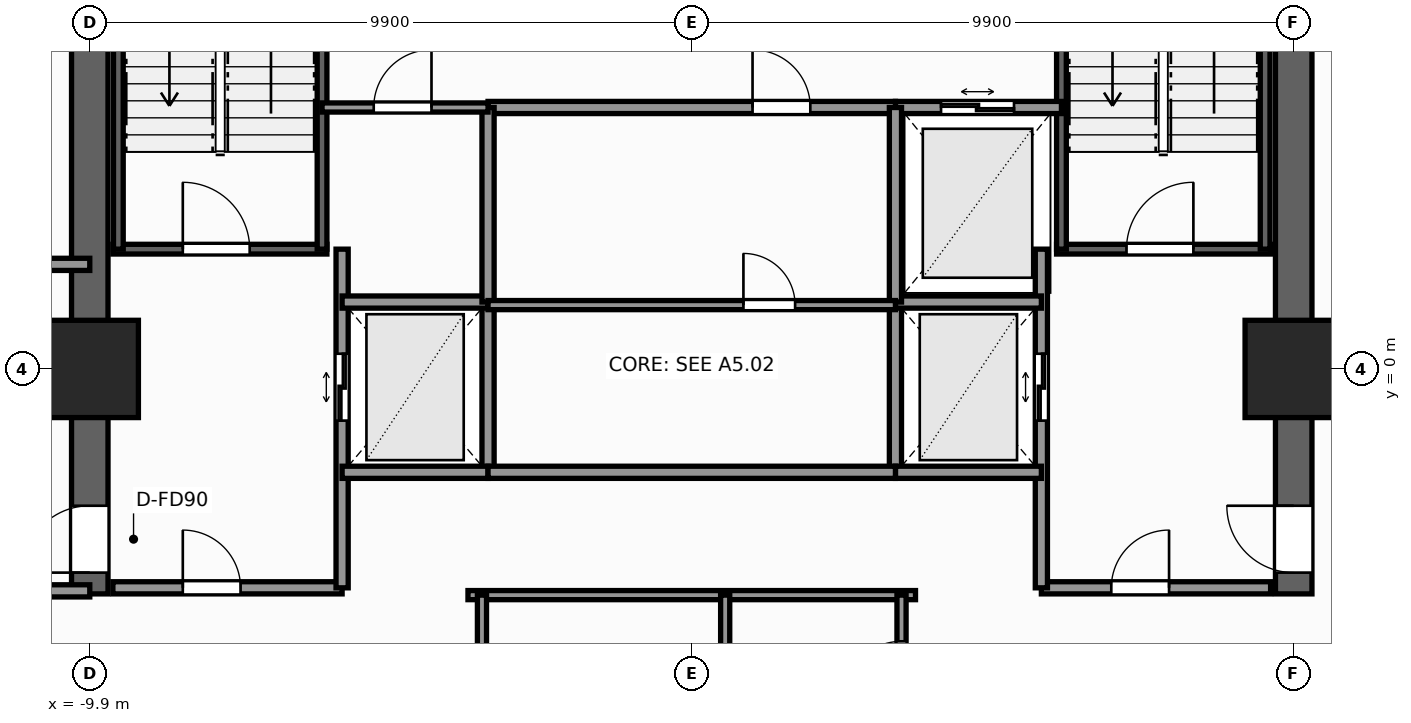
"""IFC4 building model, lengths in metres.
Left out: names, types, materials, properties, quantities, classifications, styles, units other than length and angle.
Written with IfcOpenShell. Run it as: python <this file> out.ifc"""

import sys

from ifc_helpers import new_model, si_unit, direction, frame, frame_2d, origin, origin_2d, place, context, subcontext, project, spatial, rectangle, extrude, element, fill, save


model = new_model("IFC4")
c1 = context("Model", 3, precision=1e-05, world=origin(), true_north=direction((0.0, 1.0)))
c2 = subcontext(c1, "Body", "Model", "MODEL_VIEW")
j1 = project(units=[si_unit("LENGTHUNIT", "METRE"), si_unit("PLANEANGLEUNIT", "RADIAN")], contexts=[c1])
p1 = place(None, origin())
s1 = spatial("IfcSite", under=j1, at=p1, CompositionType="ELEMENT")
p2 = place(p1, origin())
s2 = spatial("IfcBuilding", under=s1, at=p2, CompositionType="ELEMENT")
p3 = place(p2, origin())
s3 = spatial("IfcBuildingStorey", under=s2, at=p3, CompositionType="ELEMENT", Elevation=0.0)
p4 = place(p3, frame((-9.9, -3.7, 0.0), z_axis=(0.0, 0.0, 1.0), x_axis=(0.0, 1.0, 0.0)))
e1 = element("IfcWall", 1, at=p4, inside=s3, PredefinedType="SHEAR", context=c2, shape_type="SweptSolid", body=[
    extrude(rectangle(XDim=13.3, YDim=0.6, at=frame_2d((6.65, 0.0))), origin(), (0.0, 0.0, 1.0), 5.5),
])
p5 = place(p4, frame((0.35, 0.0, 0.0)))
e2 = element("IfcOpeningElement", 2, at=p5, cuts=e1, PredefinedType="OPENING", context=c2, shape_type="SweptSolid", body=[
    extrude(rectangle(XDim=1.1, YDim=2.2, at=frame_2d((0.55, 1.1))), frame((0.0, 0.31, 0.0), z_axis=(0.0, -1.0, 0.0), x_axis=(1.0, 0.0, 0.0)), (0.0, 0.0, 1.0), 0.62),
])
p6 = place(p3, frame((9.9, -3.7, 0.0), z_axis=(0.0, 0.0, 1.0), x_axis=(0.0, 1.0, 0.0)))
e3 = element("IfcWall", 3, at=p6, inside=s3, PredefinedType="SHEAR", context=c2, shape_type="SweptSolid", body=[
    extrude(rectangle(XDim=13.3, YDim=0.6, at=frame_2d((6.65, 0.0))), origin(), (0.0, 0.0, 1.0), 5.5),
])
p7 = place(p6, frame((0.35, 0.0, 0.0)))
e4 = element("IfcOpeningElement", 4, at=p7, cuts=e3, PredefinedType="OPENING", context=c2, shape_type="SweptSolid", body=[
    extrude(rectangle(XDim=1.1, YDim=2.2, at=frame_2d((0.55, 1.1))), frame((0.0, 0.31, 0.0), z_axis=(0.0, -1.0, 0.0), x_axis=(1.0, 0.0, 0.0)), (0.0, 0.0, 1.0), 0.62),
])
for number, where, z_axis, x_axis in (
    (5, (9.9, 0.0, 0.0), (0.0, 0.0, 1.0), (1.0, 0.0, 0.0)),
    (6, (-9.9, 0.0, 0.0), (0.0, 0.0, 1.0), (1.0, 0.0, 0.0)),
):
    element("IfcColumn", number, at=place(p3, frame(where, z_axis=z_axis, x_axis=x_axis)), inside=s3, PredefinedType="COLUMN", context=c2, shape_type="SweptSolid", body=[
        extrude(rectangle(XDim=1.6, YDim=1.6, at=origin_2d()), origin(), (0.0, 0.0, 1.0), 5.5),
    ])
p8 = place(p3, frame((-9.52, 1.97, 0.0), z_axis=(0.0, 0.0, 1.0), x_axis=(1.0, 0.0, 0.0)))
e7 = element("IfcWall", 7, at=p8, inside=s3, PredefinedType="SHEAR", context=c2, shape_type="SweptSolid", body=[
    extrude(rectangle(XDim=3.52, YDim=0.16, at=frame_2d((1.76, 0.0))), origin(), (0.0, 0.0, 1.0), 5.5),
])
p9 = place(p8, frame((1.15, 0.0, 0.0)))
e8 = element("IfcOpeningElement", 8, at=p9, cuts=e7, PredefinedType="OPENING", context=c2, shape_type="SweptSolid", body=[
    extrude(rectangle(XDim=1.1, YDim=2.2, at=frame_2d((0.55, 1.1))), frame((0.0, 0.09, 0.0), z_axis=(0.0, -1.0, 0.0), x_axis=(1.0, 0.0, 0.0)), (0.0, 0.0, 1.0), 0.18),
])
for number, where, z_axis, x_axis in (
    (9, (-9.43, 1.97, 0.0), (0.0, 0.0, 1.0), (0.0, 1.0, 0.0)),
    (10, (-6.08, 1.97, 0.0), (0.0, 0.0, 1.0), (0.0, 1.0, 0.0)),
):
    element("IfcWall", number, at=place(p3, frame(where, z_axis=z_axis, x_axis=x_axis)), inside=s3, PredefinedType="SHEAR", context=c2, shape_type="SweptSolid", body=[
        extrude(rectangle(XDim=7.56, YDim=0.16, at=frame_2d((3.78, 0.0))), origin(), (0.0, 0.0, 1.0), 5.5),
    ])
p10 = place(p3, frame((6.0, 1.97, 0.0), z_axis=(0.0, 0.0, 1.0), x_axis=(1.0, 0.0, 0.0)))
e11 = element("IfcWall", 11, at=p10, inside=s3, PredefinedType="SHEAR", context=c2, shape_type="SweptSolid", body=[
    extrude(rectangle(XDim=3.52, YDim=0.16, at=frame_2d((1.76, 0.0))), origin(), (0.0, 0.0, 1.0), 5.5),
])
p11 = place(p10, frame((1.15, 0.0, 0.0)))
e12 = element("IfcOpeningElement", 12, at=p11, cuts=e11, PredefinedType="OPENING", context=c2, shape_type="SweptSolid", body=[
    extrude(rectangle(XDim=1.1, YDim=2.2, at=frame_2d((0.55, 1.1))), frame((0.0, 0.09, 0.0), z_axis=(0.0, -1.0, 0.0), x_axis=(1.0, 0.0, 0.0)), (0.0, 0.0, 1.0), 0.18),
])
for number, where, z_axis, x_axis in (
    (13, (6.08, 1.97, 0.0), (0.0, 0.0, 1.0), (0.0, 1.0, 0.0)),
    (14, (9.43, 1.97, 0.0), (0.0, 0.0, 1.0), (0.0, 1.0, 0.0)),
):
    element("IfcWall", number, at=place(p3, frame(where, z_axis=z_axis, x_axis=x_axis)), inside=s3, PredefinedType="SHEAR", context=c2, shape_type="SweptSolid", body=[
        extrude(rectangle(XDim=7.56, YDim=0.16, at=frame_2d((3.78, 0.0))), origin(), (0.0, 0.0, 1.0), 5.5),
    ])
p12 = place(p3, frame((-9.52, -3.6, 0.0), z_axis=(0.0, 0.0, 1.0), x_axis=(1.0, 0.0, 0.0)))
e15 = element("IfcWall", 15, at=p12, inside=s3, PredefinedType="SOLIDWALL", context=c2, shape_type="SweptSolid", body=[
    extrude(rectangle(XDim=3.77, YDim=0.2, at=frame_2d((1.885, 0.0))), origin(), (0.0, 0.0, 1.0), 5.22),
])
p13 = place(p12, frame((1.15, 0.0, 0.0)))
e16 = element("IfcOpeningElement", 16, at=p13, cuts=e15, PredefinedType="OPENING", context=c2, shape_type="SweptSolid", body=[
    extrude(rectangle(XDim=0.95, YDim=2.06, at=frame_2d((0.475, 1.03))), frame((0.0, 0.11, 0.0), z_axis=(0.0, -1.0, 0.0), x_axis=(1.0, 0.0, 0.0)), (0.0, 0.0, 1.0), 0.22),
])
p14 = place(p3, frame((-5.75, -3.6, 0.0), z_axis=(0.0, 0.0, 1.0), x_axis=(0.0, 1.0, 0.0)))
e17 = element("IfcWall", 17, at=p14, inside=s3, PredefinedType="SOLIDWALL", context=c2, shape_type="SweptSolid", body=[
    extrude(rectangle(XDim=5.57, YDim=0.2, at=frame_2d((2.785, 0.0))), origin(), (0.0, 0.0, 1.0), 5.22),
])
p15 = place(p14, frame((2.75, 0.0, 0.0)))
e18 = element("IfcOpeningElement", 18, at=p15, cuts=e17, PredefinedType="OPENING", context=c2, shape_type="SweptSolid", body=[
    extrude(rectangle(XDim=1.1, YDim=2.2, at=frame_2d((0.55, 1.1))), frame((0.0, 0.11, 0.0), z_axis=(0.0, -1.0, 0.0), x_axis=(1.0, 0.0, 0.0)), (0.0, 0.0, 1.0), 0.22),
])
p16 = place(p3, frame((-3.35, -1.7, 0.0), z_axis=(0.0, 0.0, 1.0), x_axis=(0.0, 1.0, 0.0)))
e19 = element("IfcWall", 19, at=p16, inside=s3, PredefinedType="SOLIDWALL", context=c2, shape_type="SweptSolid", body=[
    extrude(rectangle(XDim=2.8, YDim=0.2, at=frame_2d((1.4, 0.0))), origin(), (0.0, 0.0, 1.0), 5.22),
])
for number, where, z_axis, x_axis in (
    (20, (-5.75, -1.7, 0.0), (0.0, 0.0, 1.0), (1.0, 0.0, 0.0)),
    (21, (-5.75, 1.1, 0.0), (0.0, 0.0, 1.0), (1.0, 0.0, 0.0)),
):
    element("IfcWall", number, at=place(p3, frame(where, z_axis=z_axis, x_axis=x_axis)), inside=s3, PredefinedType="SOLIDWALL", context=c2, shape_type="SweptSolid", body=[
        extrude(rectangle(XDim=2.4, YDim=0.2, at=frame_2d((1.2, 0.0))), origin(), (0.0, 0.0, 1.0), 5.22),
    ])
p17 = place(p3, frame((5.75, -3.6, 0.0), z_axis=(0.0, 0.0, 1.0), x_axis=(1.0, 0.0, 0.0)))
e22 = element("IfcWall", 22, at=p17, inside=s3, PredefinedType="SOLIDWALL", context=c2, shape_type="SweptSolid", body=[
    extrude(rectangle(XDim=3.77, YDim=0.2, at=frame_2d((1.885, 0.0))), origin(), (0.0, 0.0, 1.0), 5.22),
])
p18 = place(p17, frame((1.15, 0.0, 0.0)))
e23 = element("IfcOpeningElement", 23, at=p18, cuts=e22, PredefinedType="OPENING", context=c2, shape_type="SweptSolid", body=[
    extrude(rectangle(XDim=0.95, YDim=2.06, at=frame_2d((0.475, 1.03))), frame((0.0, 0.11, 0.0), z_axis=(0.0, -1.0, 0.0), x_axis=(1.0, 0.0, 0.0)), (0.0, 0.0, 1.0), 0.22),
])
p19 = place(p3, frame((5.75, -3.6, 0.0), z_axis=(0.0, 0.0, 1.0), x_axis=(0.0, 1.0, 0.0)))
e24 = element("IfcWall", 24, at=p19, inside=s3, PredefinedType="SOLIDWALL", context=c2, shape_type="SweptSolid", body=[
    extrude(rectangle(XDim=5.57, YDim=0.2, at=frame_2d((2.785, 0.0))), origin(), (0.0, 0.0, 1.0), 5.22),
])
p20 = place(p19, frame((2.75, 0.0, 0.0)))
e25 = element("IfcOpeningElement", 25, at=p20, cuts=e24, PredefinedType="OPENING", context=c2, shape_type="SweptSolid", body=[
    extrude(rectangle(XDim=1.1, YDim=2.2, at=frame_2d((0.55, 1.1))), frame((0.0, 0.11, 0.0), z_axis=(0.0, -1.0, 0.0), x_axis=(1.0, 0.0, 0.0)), (0.0, 0.0, 1.0), 0.22),
])
p21 = place(p3, frame((3.35, -1.7, 0.0), z_axis=(0.0, 0.0, 1.0), x_axis=(0.0, 1.0, 0.0)))
e26 = element("IfcWall", 26, at=p21, inside=s3, PredefinedType="SOLIDWALL", context=c2, shape_type="SweptSolid", body=[
    extrude(rectangle(XDim=2.8, YDim=0.2, at=frame_2d((1.4, 0.0))), origin(), (0.0, 0.0, 1.0), 5.22),
])
for number, where, z_axis, x_axis in (
    (27, (3.35, -1.7, 0.0), (0.0, 0.0, 1.0), (1.0, 0.0, 0.0)),
    (28, (3.35, 1.1, 0.0), (0.0, 0.0, 1.0), (1.0, 0.0, 0.0)),
):
    element("IfcWall", number, at=place(p3, frame(where, z_axis=z_axis, x_axis=x_axis)), inside=s3, PredefinedType="SOLIDWALL", context=c2, shape_type="SweptSolid", body=[
        extrude(rectangle(XDim=2.4, YDim=0.2, at=frame_2d((1.2, 0.0))), origin(), (0.0, 0.0, 1.0), 5.22),
    ])
p22 = place(p3, frame((3.35, 4.3, 0.0), z_axis=(0.0, 0.0, 1.0), x_axis=(1.0, 0.0, 0.0)))
e29 = element("IfcWall", 29, at=p22, inside=s3, PredefinedType="SOLIDWALL", context=c2, shape_type="SweptSolid", body=[
    extrude(rectangle(XDim=2.73, YDim=0.2, at=frame_2d((1.365, 0.0))), origin(), (0.0, 0.0, 1.0), 5.22),
])
p23 = place(p22, frame((0.75, 0.0, 0.0)))
e30 = element("IfcOpeningElement", 30, at=p23, cuts=e29, PredefinedType="OPENING", context=c2, shape_type="SweptSolid", body=[
    extrude(rectangle(XDim=1.2, YDim=2.25, at=frame_2d((0.6, 1.125))), frame((0.0, 0.11, 0.0), z_axis=(0.0, -1.0, 0.0), x_axis=(1.0, 0.0, 0.0)), (0.0, 0.0, 1.0), 0.22),
])
p24 = place(p3, frame((-3.35, 4.3, 0.0), z_axis=(0.0, 0.0, 1.0), x_axis=(1.0, 0.0, 0.0)))
e31 = element("IfcWall", 31, at=p24, inside=s3, PredefinedType="SOLIDWALL", context=c2, shape_type="SweptSolid", body=[
    extrude(rectangle(XDim=6.7, YDim=0.2, at=frame_2d((3.35, 0.0))), origin(), (0.0, 0.0, 1.0), 5.22),
])
p25 = place(p24, frame((4.35, 0.0, 0.0)))
e32 = element("IfcOpeningElement", 32, at=p25, cuts=e31, PredefinedType="OPENING", context=c2, shape_type="SweptSolid", body=[
    extrude(rectangle(XDim=0.95, YDim=2.06, at=frame_2d((0.475, 1.03))), frame((0.0, 0.11, 0.0), z_axis=(0.0, -1.0, 0.0), x_axis=(1.0, 0.0, 0.0)), (0.0, 0.0, 1.0), 0.22),
])
p26 = place(p3, frame((-3.35, -1.7, 0.0), z_axis=(0.0, 0.0, 1.0), x_axis=(1.0, 0.0, 0.0)))
e33 = element("IfcWall", 33, at=p26, inside=s3, PredefinedType="SOLIDWALL", context=c2, shape_type="SweptSolid", body=[
    extrude(rectangle(XDim=6.7, YDim=0.2, at=frame_2d((3.35, 0.0))), origin(), (0.0, 0.0, 1.0), 5.22),
])
for number, where, z_axis, x_axis in (
    (34, (-3.35, 1.1, 0.0), (0.0, 0.0, 1.0), (0.0, 1.0, 0.0)),
    (35, (3.35, 1.1, 0.0), (0.0, 0.0, 1.0), (0.0, 1.0, 0.0)),
):
    element("IfcWall", number, at=place(p3, frame(where, z_axis=z_axis, x_axis=x_axis)), inside=s3, PredefinedType="SOLIDWALL", context=c2, shape_type="SweptSolid", body=[
        extrude(rectangle(XDim=3.2, YDim=0.2, at=frame_2d((1.6, 0.0))), origin(), (0.0, 0.0, 1.0), 5.22),
    ])
p27 = place(p3, frame((-3.35, 1.05, 0.0), z_axis=(0.0, 0.0, 1.0), x_axis=(1.0, 0.0, 0.0)))
e36 = element("IfcWall", 36, at=p27, inside=s3, PredefinedType="PARTITIONING", context=c2, shape_type="SweptSolid", body=[
    extrude(rectangle(XDim=6.7, YDim=0.15, at=frame_2d((3.35, 0.0))), origin(), (0.0, 0.0, 1.0), 5.22),
])
p28 = place(p27, frame((4.2, 0.0, 0.0)))
e37 = element("IfcOpeningElement", 37, at=p28, cuts=e36, PredefinedType="OPENING", context=c2, shape_type="SweptSolid", body=[
    extrude(rectangle(XDim=0.85, YDim=2.03, at=frame_2d((0.425, 1.015))), frame((0.0, 0.085, 0.0), z_axis=(0.0, -1.0, 0.0), x_axis=(1.0, 0.0, 0.0)), (0.0, 0.0, 1.0), 0.17),
])
p29 = place(p3, frame((-3.68, -3.72, 0.0), z_axis=(0.0, 0.0, 1.0), x_axis=(1.0, 0.0, 0.0)))
e38 = element("IfcWall", 38, at=p29, inside=s3, PredefinedType="PARTITIONING", context=c2, shape_type="SweptSolid", body=[
    extrude(rectangle(XDim=7.36, YDim=0.15, at=frame_2d((3.68, 0.0))), origin(), (0.0, 0.0, 1.0), 5.22),
])
p30 = place(p3, frame((3.45, -6.08, 0.0), z_axis=(0.0, 0.0, 1.0), x_axis=(0.0, 1.0, 0.0)))
e39 = element("IfcWall", 39, at=p30, inside=s3, PredefinedType="PARTITIONING", context=c2, shape_type="SweptSolid", body=[
    extrude(rectangle(XDim=2.36, YDim=0.15, at=frame_2d((1.18, 0.0))), origin(), (0.0, 0.0, 1.0), 5.22),
])
p31 = place(p30, frame((0.65, 0.0, 0.0)))
e40 = element("IfcOpeningElement", 40, at=p31, cuts=e39, PredefinedType="OPENING", context=c2, shape_type="SweptSolid", body=[
    extrude(rectangle(XDim=0.95, YDim=2.06, at=frame_2d((0.475, 1.03))), frame((0.0, 0.085, 0.0), z_axis=(0.0, -1.0, 0.0), x_axis=(1.0, 0.0, 0.0)), (0.0, 0.0, 1.0), 0.17),
])
p32 = place(p3, frame((-3.45, -6.08, 0.0), z_axis=(0.0, 0.0, 1.0), x_axis=(0.0, 1.0, 0.0)))
e41 = element("IfcWall", 41, at=p32, inside=s3, PredefinedType="PARTITIONING", context=c2, shape_type="SweptSolid", body=[
    extrude(rectangle(XDim=2.36, YDim=0.15, at=frame_2d((1.18, 0.0))), origin(), (0.0, 0.0, 1.0), 5.22),
])
p33 = place(p3, frame((0.55, -6.08, 0.0), z_axis=(0.0, 0.0, 1.0), x_axis=(0.0, 1.0, 0.0)))
e42 = element("IfcWall", 42, at=p33, inside=s3, PredefinedType="PARTITIONING", context=c2, shape_type="SweptSolid", body=[
    extrude(rectangle(XDim=2.36, YDim=0.15, at=frame_2d((1.18, 0.0))), origin(), (0.0, 0.0, 1.0), 5.22),
])
p34 = place(p33, frame((0.65, 0.0, 0.0)))
e43 = element("IfcOpeningElement", 43, at=p34, cuts=e42, PredefinedType="OPENING", context=c2, shape_type="SweptSolid", body=[
    extrude(rectangle(XDim=0.9, YDim=2.06, at=frame_2d((0.45, 1.03))), frame((0.0, 0.085, 0.0), z_axis=(0.0, -1.0, 0.0), x_axis=(1.0, 0.0, 0.0)), (0.0, 0.0, 1.0), 0.17),
])
p35 = place(p3, frame((-6.08, 4.3, 0.0), z_axis=(0.0, 0.0, 1.0), x_axis=(1.0, 0.0, 0.0)))
e44 = element("IfcWall", 44, at=p35, inside=s3, PredefinedType="PARTITIONING", context=c2, shape_type="SweptSolid", body=[
    extrude(rectangle(XDim=2.73, YDim=0.15, at=frame_2d((1.365, 0.0))), origin(), (0.0, 0.0, 1.0), 5.22),
])
p36 = place(p35, frame((0.85, 0.0, 0.0)))
e45 = element("IfcOpeningElement", 45, at=p36, cuts=e44, PredefinedType="OPENING", context=c2, shape_type="SweptSolid", body=[
    extrude(rectangle(XDim=0.95, YDim=2.06, at=frame_2d((0.475, 1.03))), frame((0.0, 0.085, 0.0), z_axis=(0.0, -1.0, 0.0), x_axis=(1.0, 0.0, 0.0)), (0.0, 0.0, 1.0), 0.17),
])
p37 = place(p3, frame((-12.72, -3.65, 0.0), z_axis=(0.0, 0.0, 1.0), x_axis=(1.0, 0.0, 0.0)))
e46 = element("IfcWall", 46, at=p37, inside=s3, PredefinedType="SOLIDWALL", context=c2, shape_type="SweptSolid", body=[
    extrude(rectangle(XDim=2.82, YDim=0.2, at=frame_2d((1.41, 0.0))), origin(), (0.0, 0.0, 1.0), 4.255),
])
p38 = place(p3, frame((-21.85, 1.72, 0.0), z_axis=(0.0, 0.0, 1.0), x_axis=(1.0, 0.0, 0.0)))
e47 = element("IfcWall", 47, at=p38, inside=s3, PredefinedType="SOLIDWALL", context=c2, shape_type="SweptSolid", body=[
    extrude(rectangle(XDim=11.95, YDim=0.2, at=frame_2d((5.975, 0.0))), origin(), (0.0, 0.0, 1.0), 5.22),
])
p39 = place(p38, frame((9.8, 0.0, 0.0)))
e48 = element("IfcOpeningElement", 48, at=p39, cuts=e47, PredefinedType="OPENING", context=c2, shape_type="SweptSolid", body=[
    extrude(rectangle(XDim=1.1, YDim=2.2, at=frame_2d((0.55, 1.1))), frame((0.0, 0.11, 0.0), z_axis=(0.0, -1.0, 0.0), x_axis=(1.0, 0.0, 0.0)), (0.0, 0.0, 1.0), 0.22),
])
p40 = place(p9, origin())
e49 = element("IfcDoor", 49, at=p40, inside=s3, OperationType="SINGLE_SWING_LEFT", PredefinedType="DOOR", context=c2, shape_type="SweptSolid", body=[
    extrude(rectangle(XDim=1.1, YDim=2.2, at=frame_2d((0.55, 1.1))), frame((0.0, 0.025, 0.0), z_axis=(0.0, -1.0, 0.0), x_axis=(1.0, 0.0, 0.0)), (0.0, 0.0, 1.0), 0.05),
])
fill(e8, e49)
p41 = place(p11, origin())
e50 = element("IfcDoor", 50, at=p41, inside=s3, OperationType="SINGLE_SWING_RIGHT", PredefinedType="DOOR", context=c2, shape_type="SweptSolid", body=[
    extrude(rectangle(XDim=1.1, YDim=2.2, at=frame_2d((0.55, 1.1))), frame((0.0, 0.025, 0.0), z_axis=(0.0, -1.0, 0.0), x_axis=(1.0, 0.0, 0.0)), (0.0, 0.0, 1.0), 0.05),
])
fill(e12, e50)
p42 = place(p5, origin())
e51 = element("IfcDoor", 51, at=p42, inside=s3, OperationType="SINGLE_SWING_LEFT", PredefinedType="DOOR", context=c2, shape_type="SweptSolid", body=[
    extrude(rectangle(XDim=1.1, YDim=2.2, at=frame_2d((0.55, 1.1))), frame((0.0, 0.025, 0.0), z_axis=(0.0, -1.0, 0.0), x_axis=(1.0, 0.0, 0.0)), (0.0, 0.0, 1.0), 0.05),
])
fill(e2, e51)
p43 = place(p15, origin())
e52 = element("IfcDoor", 52, at=p43, inside=s3, OperationType="DOUBLE_DOOR_SLIDING", PredefinedType="DOOR", context=c2, shape_type="SweptSolid", body=[
    extrude(rectangle(XDim=1.1, YDim=2.2, at=frame_2d((0.55, 1.1))), frame((0.0, 0.025, 0.0), z_axis=(0.0, -1.0, 0.0), x_axis=(1.0, 0.0, 0.0)), (0.0, 0.0, 1.0), 0.05),
])
fill(e18, e52)
p44 = place(p7, origin())
e53 = element("IfcDoor", 53, at=p44, inside=s3, OperationType="SINGLE_SWING_RIGHT", PredefinedType="DOOR", context=c2, shape_type="SweptSolid", body=[
    extrude(rectangle(XDim=1.1, YDim=2.2, at=frame_2d((0.55, 1.1))), frame((0.0, 0.025, 0.0), z_axis=(0.0, -1.0, 0.0), x_axis=(1.0, 0.0, 0.0)), (0.0, 0.0, 1.0), 0.05),
])
fill(e4, e53)
p45 = place(p20, origin())
e54 = element("IfcDoor", 54, at=p45, inside=s3, OperationType="DOUBLE_DOOR_SLIDING", PredefinedType="DOOR", context=c2, shape_type="SweptSolid", body=[
    extrude(rectangle(XDim=1.1, YDim=2.2, at=frame_2d((0.55, 1.1))), frame((0.0, 0.025, 0.0), z_axis=(0.0, -1.0, 0.0), x_axis=(1.0, 0.0, 0.0)), (0.0, 0.0, 1.0), 0.05),
])
fill(e25, e54)
p46 = place(p23, origin())
e55 = element("IfcDoor", 55, at=p46, inside=s3, OperationType="DOUBLE_DOOR_SLIDING", PredefinedType="DOOR", context=c2, shape_type="SweptSolid", body=[
    extrude(rectangle(XDim=1.2, YDim=2.25, at=frame_2d((0.6, 1.125))), frame((0.0, 0.025, 0.0), z_axis=(0.0, -1.0, 0.0), x_axis=(1.0, 0.0, 0.0)), (0.0, 0.0, 1.0), 0.05),
])
fill(e30, e55)
p47 = place(p13, origin())
e56 = element("IfcDoor", 56, at=p47, inside=s3, OperationType="SINGLE_SWING_LEFT", PredefinedType="DOOR", context=c2, shape_type="SweptSolid", body=[
    extrude(rectangle(XDim=0.95, YDim=2.06, at=frame_2d((0.475, 1.03))), frame((0.0, 0.025, 0.0), z_axis=(0.0, -1.0, 0.0), x_axis=(1.0, 0.0, 0.0)), (0.0, 0.0, 1.0), 0.05),
])
fill(e16, e56)
p48 = place(p18, origin())
e57 = element("IfcDoor", 57, at=p48, inside=s3, OperationType="SINGLE_SWING_RIGHT", PredefinedType="DOOR", context=c2, shape_type="SweptSolid", body=[
    extrude(rectangle(XDim=0.95, YDim=2.06, at=frame_2d((0.475, 1.03))), frame((0.0, 0.025, 0.0), z_axis=(0.0, -1.0, 0.0), x_axis=(1.0, 0.0, 0.0)), (0.0, 0.0, 1.0), 0.05),
])
fill(e23, e57)
p49 = place(p25, origin())
e58 = element("IfcDoor", 58, at=p49, inside=s3, OperationType="SINGLE_SWING_LEFT", PredefinedType="DOOR", context=c2, shape_type="SweptSolid", body=[
    extrude(rectangle(XDim=0.95, YDim=2.06, at=frame_2d((0.475, 1.03))), frame((0.0, 0.025, 0.0), z_axis=(0.0, -1.0, 0.0), x_axis=(1.0, 0.0, 0.0)), (0.0, 0.0, 1.0), 0.05),
])
fill(e32, e58)
p50 = place(p28, origin())
e59 = element("IfcDoor", 59, at=p50, inside=s3, OperationType="SINGLE_SWING_LEFT", PredefinedType="DOOR", context=c2, shape_type="SweptSolid", body=[
    extrude(rectangle(XDim=0.85, YDim=2.03, at=frame_2d((0.425, 1.015))), frame((0.0, 0.025, 0.0), z_axis=(0.0, -1.0, 0.0), x_axis=(1.0, 0.0, 0.0)), (0.0, 0.0, 1.0), 0.05),
])
fill(e37, e59)
p51 = place(p31, origin())
e60 = element("IfcDoor", 60, at=p51, inside=s3, OperationType="SINGLE_SWING_LEFT", PredefinedType="DOOR", context=c2, shape_type="SweptSolid", body=[
    extrude(rectangle(XDim=0.95, YDim=2.06, at=frame_2d((0.475, 1.03))), frame((0.0, 0.025, 0.0), z_axis=(0.0, -1.0, 0.0), x_axis=(1.0, 0.0, 0.0)), (0.0, 0.0, 1.0), 0.05),
])
fill(e40, e60)
p52 = place(p36, origin())
e61 = element("IfcDoor", 61, at=p52, inside=s3, OperationType="SINGLE_SWING_RIGHT", PredefinedType="DOOR", context=c2, shape_type="SweptSolid", body=[
    extrude(rectangle(XDim=0.95, YDim=2.06, at=frame_2d((0.475, 1.03))), frame((0.0, 0.025, 0.0), z_axis=(0.0, -1.0, 0.0), x_axis=(1.0, 0.0, 0.0)), (0.0, 0.0, 1.0), 0.05),
])
fill(e45, e61)
save(model, sys.argv[1])
